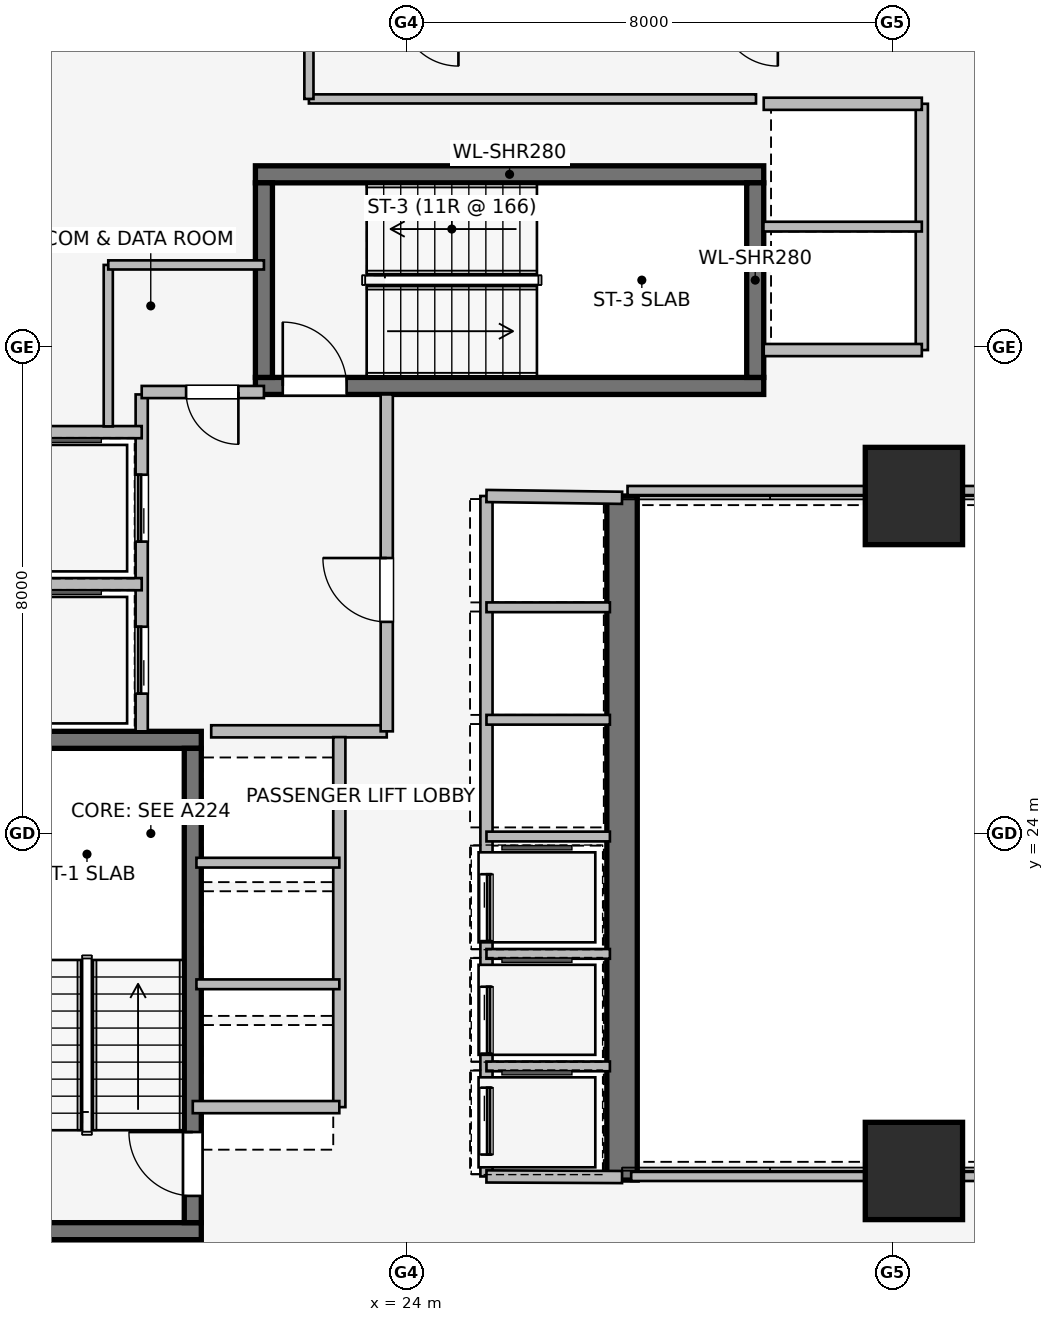
"""IFC4 building model, lengths in metres.
Left out: names, types, materials, properties, quantities, classifications, styles, units other than length and angle.
Written with IfcOpenShell. Run it as: python <this file> out.ifc"""

import sys

from ifc_helpers import new_model, si_unit, direction, frame, frame_2d, origin, origin_2d, place, context, subcontext, project, spatial, rectangle, extrude, element, fill, save


model = new_model("IFC4")
c1 = context("Model", 3, precision=1e-05, world=origin(), true_north=direction((0.0, 1.0)))
c2 = subcontext(c1, "Body", "Model", "MODEL_VIEW")
j1 = project(units=[si_unit("LENGTHUNIT", "METRE"), si_unit("PLANEANGLEUNIT", "RADIAN")], contexts=[c1])
p1 = place(None, origin())
s1 = spatial("IfcSite", under=j1, at=p1, CompositionType="ELEMENT")
p2 = place(p1, origin())
s2 = spatial("IfcBuilding", under=s1, at=p2, CompositionType="ELEMENT")
p3 = place(p2, frame((0.0, 0.0, 85.4)))
s3 = spatial("IfcBuildingStorey", under=s2, at=p3, CompositionType="ELEMENT", Elevation=85.4)
p4 = place(p3, frame((27.55, 29.55, 0.0), z_axis=(0.0, 0.0, 1.0), x_axis=(0.0, -1.0, 0.0)))
e1 = element("IfcWall", 1, at=p4, inside=s3, PredefinedType="SHEAR", context=c2, shape_type="SweptSolid", body=[
    extrude(rectangle(XDim=11.25, YDim=0.5, at=frame_2d((5.625, 0.0))), origin(), (0.0, 0.0, 1.0), 3.65),
])
for number, where, z_axis, x_axis in (
    (2, (16.87, 17.46, 0.0), (0.0, 0.0, 1.0), (1.0, 0.0, 0.0)),
    (3, (20.63, 25.54, 0.0), (0.0, 0.0, 1.0), (-1.0, 0.0, 0.0)),
):
    element("IfcWall", number, at=place(p3, frame(where, z_axis=z_axis, x_axis=x_axis)), inside=s3, PredefinedType="SHEAR", context=c2, shape_type="SweptSolid", body=[
        extrude(rectangle(XDim=3.76, YDim=0.28, at=frame_2d((1.88, 0.0))), origin(), (0.0, 0.0, 1.0), 3.65),
    ])
p5 = place(p3, frame((20.49, 17.6, 0.0), z_axis=(0.0, 0.0, 1.0), x_axis=(0.0, 1.0, 0.0)))
e4 = element("IfcWall", 4, at=p5, inside=s3, PredefinedType="SHEAR", context=c2, shape_type="SweptSolid", body=[
    extrude(rectangle(XDim=7.8, YDim=0.28, at=frame_2d((3.9, 0.0))), origin(), (0.0, 0.0, 1.0), 3.65),
])
p6 = place(p5, frame((0.44, 0.0, 0.0)))
e5 = element("IfcOpeningElement", 5, at=p6, cuts=e4, PredefinedType="OPENING", context=c2, shape_type="SweptSolid", body=[
    extrude(rectangle(XDim=1.05, YDim=2.0, at=frame_2d((0.525, 1.0))), frame((0.0, 0.15, 0.0), z_axis=(0.0, -1.0, 0.0), x_axis=(1.0, 0.0, 0.0)), (0.0, 0.0, 1.0), 0.3),
])
p7 = place(p3, frame((21.52, 31.36, 0.0), z_axis=(0.0, 0.0, 1.0), x_axis=(1.0, 0.0, 0.0)))
e6 = element("IfcWall", 6, at=p7, inside=s3, PredefinedType="SHEAR", context=c2, shape_type="SweptSolid", body=[
    extrude(rectangle(XDim=8.36, YDim=0.28, at=frame_2d((4.18, 0.0))), origin(), (0.0, 0.0, 1.0), 3.65),
])
p8 = place(p7, frame((0.45, 0.0, 0.0)))
e7 = element("IfcOpeningElement", 7, at=p8, cuts=e6, PredefinedType="OPENING", context=c2, shape_type="SweptSolid", body=[
    extrude(rectangle(XDim=1.05, YDim=2.0, at=frame_2d((0.525, 1.0))), frame((0.0, 0.15, 0.0), z_axis=(0.0, -1.0, 0.0), x_axis=(1.0, 0.0, 0.0)), (0.0, 0.0, 1.0), 0.3),
])
p9 = place(p3, frame((29.88, 34.84, 0.0), z_axis=(0.0, 0.0, 1.0), x_axis=(-1.0, 0.0, 0.0)))
e8 = element("IfcWall", 8, at=p9, inside=s3, PredefinedType="SHEAR", context=c2, shape_type="SweptSolid", body=[
    extrude(rectangle(XDim=8.36, YDim=0.28, at=frame_2d((4.18, 0.0))), origin(), (0.0, 0.0, 1.0), 3.65),
])
for number, where, z_axis, x_axis in (
    (9, (21.66, 34.7, 0.0), (0.0, 0.0, 1.0), (0.0, -1.0, 0.0)),
    (10, (29.74, 31.5, 0.0), (0.0, 0.0, 1.0), (0.0, 1.0, 0.0)),
):
    element("IfcWall", number, at=place(p3, frame(where, z_axis=z_axis, x_axis=x_axis)), inside=s3, PredefinedType="SHEAR", context=c2, shape_type="SweptSolid", body=[
        extrude(rectangle(XDim=3.2, YDim=0.28, at=frame_2d((1.6, 0.0))), origin(), (0.0, 0.0, 1.0), 3.65),
    ])
for number, where, z_axis, x_axis in (
    (11, (32.35, 18.45, 0.0), (0.0, 0.0, 1.0), (1.0, 0.0, 0.0)),
    (12, (32.35, 29.55, 0.0), (0.0, 0.0, 1.0), (1.0, 0.0, 0.0)),
):
    element("IfcColumn", number, at=place(p3, frame(where, z_axis=z_axis, x_axis=x_axis)), inside=s3, PredefinedType="COLUMN", context=c2, shape_type="SweptSolid", body=[
        extrude(rectangle(XDim=1.6, YDim=1.6, at=origin_2d()), origin(), (0.0, 0.0, 1.0), 3.65),
    ])
p10 = place(p3, frame((16.924, 36.841, 0.0), z_axis=(0.0, 0.0, 1.0), x_axis=(0.888634413993, 0.458616264721, 0.0)))
e13 = element("IfcWall", 13, at=p10, inside=s3, PredefinedType="STANDARD", context=c2, shape_type="SweptSolid", body=[
    extrude(rectangle(XDim=20.531, YDim=0.34, at=frame_2d((10.266, 0.0))), origin(), (0.0, 0.0, 1.0), 2.684),
])
p11 = place(p10, frame((5.111, 0.0, 0.75)))
e14 = element("IfcOpeningElement", 14, at=p11, cuts=e13, PredefinedType="OPENING", context=c2, shape_type="SweptSolid", body=[
    extrude(rectangle(XDim=1.8, YDim=1.5, at=frame_2d((0.9, 0.75))), frame((0.0, 0.18, 0.0), z_axis=(0.0, -1.0, 0.0), x_axis=(1.0, 0.0, 0.0)), (0.0, 0.0, 1.0), 0.36),
])
p12 = place(p10, frame((7.44, 0.0, 0.75)))
e15 = element("IfcOpeningElement", 15, at=p12, cuts=e13, PredefinedType="OPENING", context=c2, shape_type="SweptSolid", body=[
    extrude(rectangle(XDim=1.8, YDim=1.5, at=frame_2d((0.9, 0.75))), frame((0.0, 0.18, 0.0), z_axis=(0.0, -1.0, 0.0), x_axis=(1.0, 0.0, 0.0)), (0.0, 0.0, 1.0), 0.36),
])
p13 = place(p10, frame((10.843, 0.0, 0.75)))
e16 = element("IfcOpeningElement", 16, at=p13, cuts=e13, PredefinedType="OPENING", context=c2, shape_type="SweptSolid", body=[
    extrude(rectangle(XDim=1.5, YDim=1.5, at=frame_2d((0.75, 0.75))), frame((0.0, 0.18, 0.0), z_axis=(0.0, -1.0, 0.0), x_axis=(1.0, 0.0, 0.0)), (0.0, 0.0, 1.0), 0.36),
])
p14 = place(p10, frame((13.571, 0.0, 0.75)))
e17 = element("IfcOpeningElement", 17, at=p14, cuts=e13, PredefinedType="OPENING", context=c2, shape_type="SweptSolid", body=[
    extrude(rectangle(XDim=1.5, YDim=1.5, at=frame_2d((0.75, 0.75))), frame((0.0, 0.18, 0.0), z_axis=(0.0, -1.0, 0.0), x_axis=(1.0, 0.0, 0.0)), (0.0, 0.0, 1.0), 0.36),
])
p15 = place(p10, frame((17.476, 0.0, 0.75)))
e18 = element("IfcOpeningElement", 18, at=p15, cuts=e13, PredefinedType="OPENING", context=c2, shape_type="SweptSolid", body=[
    extrude(rectangle(XDim=1.05, YDim=1.4, at=frame_2d((0.525, 0.7))), frame((0.0, 0.18, 0.0), z_axis=(0.0, -1.0, 0.0), x_axis=(1.0, 0.0, 0.0)), (0.0, 0.0, 1.0), 0.36),
])
p16 = place(p3, frame((19.65, 25.68, 0.0), z_axis=(0.0, 0.0, 1.0), x_axis=(0.0, 1.0, 0.0)))
e19 = element("IfcWall", 19, at=p16, inside=s3, PredefinedType="PARTITIONING", context=c2, shape_type="SweptSolid", body=[
    extrude(rectangle(XDim=5.54, YDim=0.2, at=frame_2d((2.77, 0.0))), origin(), (0.0, 0.0, 1.0), 3.39),
])
p17 = place(p16, frame((0.62, 0.0, 0.0)))
e20 = element("IfcOpeningElement", 20, at=p17, cuts=e19, PredefinedType="OPENING", context=c2, shape_type="SweptSolid", body=[
    extrude(rectangle(XDim=1.1, YDim=2.2, at=frame_2d((0.55, 1.1))), frame((0.0, 0.11, 0.0), z_axis=(0.0, -1.0, 0.0), x_axis=(1.0, 0.0, 0.0)), (0.0, 0.0, 1.0), 0.22),
])
p18 = place(p16, frame((3.12, 0.0, 0.0)))
e21 = element("IfcOpeningElement", 21, at=p18, cuts=e19, PredefinedType="OPENING", context=c2, shape_type="SweptSolid", body=[
    extrude(rectangle(XDim=1.1, YDim=2.2, at=frame_2d((0.55, 1.1))), frame((0.0, 0.11, 0.0), z_axis=(0.0, -1.0, 0.0), x_axis=(1.0, 0.0, 0.0)), (0.0, 0.0, 1.0), 0.22),
])
p19 = place(p3, frame((20.793, 25.68, 0.0), z_axis=(0.0, 0.0, 1.0), x_axis=(1.0, 0.0, 0.0)))
e22 = element("IfcWall", 22, at=p19, inside=s3, PredefinedType="PARTITIONING", context=c2, shape_type="SweptSolid", body=[
    extrude(rectangle(XDim=2.887, YDim=0.2, at=frame_2d((1.443, 0.0))), origin(), (0.0, 0.0, 1.0), 3.39),
])
p20 = place(p3, frame((23.68, 25.68, 0.0), z_axis=(0.0, 0.0, 1.0), x_axis=(0.0, 1.0, 0.0)))
e23 = element("IfcWall", 23, at=p20, inside=s3, PredefinedType="PARTITIONING", context=c2, shape_type="SweptSolid", body=[
    extrude(rectangle(XDim=5.54, YDim=0.2, at=frame_2d((2.77, 0.0))), origin(), (0.0, 0.0, 1.0), 3.39),
])
p21 = place(p20, frame((1.8, 0.0, 0.0)))
e24 = element("IfcOpeningElement", 24, at=p21, cuts=e23, PredefinedType="OPENING", context=c2, shape_type="SweptSolid", body=[
    extrude(rectangle(XDim=1.05, YDim=2.0, at=frame_2d((0.525, 1.0))), frame((0.0, 0.11, 0.0), z_axis=(0.0, -1.0, 0.0), x_axis=(1.0, 0.0, 0.0)), (0.0, 0.0, 1.0), 0.22),
])
p22 = place(p3, frame((21.66, 31.26, 0.0), z_axis=(0.0, 0.0, 1.0), x_axis=(-1.0, 0.0, 0.0)))
e25 = element("IfcWall", 25, at=p22, inside=s3, PredefinedType="PARTITIONING", context=c2, shape_type="SweptSolid", body=[
    extrude(rectangle(XDim=2.01, YDim=0.2, at=frame_2d((1.005, 0.0))), origin(), (0.0, 0.0, 1.0), 3.39),
])
p23 = place(p22, frame((0.42, 0.0, 0.0)))
e26 = element("IfcOpeningElement", 26, at=p23, cuts=e25, PredefinedType="OPENING", context=c2, shape_type="SweptSolid", body=[
    extrude(rectangle(XDim=0.86, YDim=2.0, at=frame_2d((0.43, 1.0))), frame((0.0, 0.11, 0.0), z_axis=(0.0, -1.0, 0.0), x_axis=(1.0, 0.0, 0.0)), (0.0, 0.0, 1.0), 0.22),
])
p24 = place(p3, frame((17.15, 28.1, 0.0), z_axis=(0.0, 0.0, 1.0), x_axis=(1.0, 0.0, 0.0)))
e27 = element("IfcWall", 27, at=p24, inside=s3, PredefinedType="PARTITIONING", context=c2, shape_type="SweptSolid", body=[
    extrude(rectangle(XDim=2.5, YDim=0.2, at=frame_2d((1.25, 0.0))), origin(), (0.0, 0.0, 1.0), 3.39),
])
p25 = place(p3, frame((19.65, 30.6, 0.0), z_axis=(0.0, 0.0, 1.0), x_axis=(-1.0, 0.0, 0.0)))
e28 = element("IfcWall", 28, at=p25, inside=s3, PredefinedType="PARTITIONING", context=c2, shape_type="SweptSolid", body=[
    extrude(rectangle(XDim=2.5, YDim=0.2, at=frame_2d((1.25, 0.0))), origin(), (0.0, 0.0, 1.0), 2.29),
])
p26 = place(p3, frame((32.48, 31.95, 0.0), z_axis=(0.0, 0.0, 1.0), x_axis=(0.0, 1.0, 0.0)))
e29 = element("IfcWall", 29, at=p26, inside=s3, PredefinedType="PARTITIONING", context=c2, shape_type="SweptSolid", body=[
    extrude(rectangle(XDim=4.05, YDim=0.2, at=frame_2d((2.025, 0.0))), origin(), (0.0, 0.0, 1.0), 2.513),
])
for number, where, z_axis, x_axis in (
    (30, (29.88, 36.0, 0.0), (0.0, 0.0, 1.0), (1.0, 0.0, 0.0)),
    (31, (32.48, 31.95, 0.0), (0.0, 0.0, 1.0), (-1.0, 0.0, 0.0)),
):
    element("IfcWall", number, at=place(p3, frame(where, z_axis=z_axis, x_axis=x_axis)), inside=s3, PredefinedType="PARTITIONING", context=c2, shape_type="SweptSolid", body=[
        extrude(rectangle(XDim=2.6, YDim=0.2, at=frame_2d((1.3, 0.0))), origin(), (0.0, 0.0, 1.0), 3.39),
    ])
p27 = place(p3, frame((29.875, 33.98, 0.0), z_axis=(0.0, 0.0, 1.0), x_axis=(1.0, 0.0, 0.0)))
e32 = element("IfcWall", 32, at=p27, inside=s3, PredefinedType="PARTITIONING", context=c2, shape_type="SweptSolid", body=[
    extrude(rectangle(XDim=2.605, YDim=0.16, at=frame_2d((1.302, 0.0))), origin(), (0.0, 0.0, 1.0), 3.39),
])
p28 = place(p3, frame((22.9, 19.5, 0.0), z_axis=(0.0, 0.0, 1.0), x_axis=(0.0, 1.0, 0.0)))
e33 = element("IfcWall", 33, at=p28, inside=s3, PredefinedType="PARTITIONING", context=c2, shape_type="SweptSolid", body=[
    extrude(rectangle(XDim=6.085, YDim=0.2, at=frame_2d((3.042, 0.0))), origin(), (0.0, 0.0, 1.0), 3.39),
])
p29 = place(p3, frame((20.49, 19.5, 0.0), z_axis=(0.0, 0.0, 1.0), x_axis=(1.0, 0.0, 0.0)))
e34 = element("IfcWall", 34, at=p29, inside=s3, PredefinedType="PARTITIONING", context=c2, shape_type="SweptSolid", body=[
    extrude(rectangle(XDim=2.41, YDim=0.2, at=frame_2d((1.205, 0.0))), origin(), (0.0, 0.0, 1.0), 2.29),
])
for number, where, z_axis, x_axis in (
    (35, (20.55, 21.52, 0.0), (0.0, 0.0, 1.0), (1.0, 0.0, 0.0)),
    (36, (20.55, 23.52, 0.0), (0.0, 0.0, 1.0), (1.0, 0.0, 0.0)),
):
    element("IfcWall", number, at=place(p3, frame(where, z_axis=z_axis, x_axis=x_axis)), inside=s3, PredefinedType="PARTITIONING", context=c2, shape_type="SweptSolid", body=[
        extrude(rectangle(XDim=2.35, YDim=0.16, at=frame_2d((1.175, 0.0))), origin(), (0.0, 0.0, 1.0), 3.39),
    ])
p30 = place(p3, frame((25.32, 29.55, 0.0), z_axis=(0.0, 0.0, 1.0), x_axis=(0.0, -1.0, 0.0)))
e37 = element("IfcWall", 37, at=p30, inside=s3, PredefinedType="PARTITIONING", context=c2, shape_type="SweptSolid", body=[
    extrude(rectangle(XDim=11.19, YDim=0.2, at=frame_2d((5.595, 0.0))), origin(), (0.0, 0.0, 1.0), 3.39),
])
p31 = place(p30, frame((6.22, 0.0, 0.0)))
e38 = element("IfcOpeningElement", 38, at=p31, cuts=e37, PredefinedType="OPENING", context=c2, shape_type="SweptSolid", body=[
    extrude(rectangle(XDim=1.1, YDim=2.2, at=frame_2d((0.55, 1.1))), frame((0.0, 0.11, 0.0), z_axis=(0.0, -1.0, 0.0), x_axis=(1.0, 0.0, 0.0)), (0.0, 0.0, 1.0), 0.22),
])
p32 = place(p30, frame((8.07, 0.0, 0.0)))
e39 = element("IfcOpeningElement", 39, at=p32, cuts=e37, PredefinedType="OPENING", context=c2, shape_type="SweptSolid", body=[
    extrude(rectangle(XDim=1.1, YDim=2.2, at=frame_2d((0.55, 1.1))), frame((0.0, 0.11, 0.0), z_axis=(0.0, -1.0, 0.0), x_axis=(1.0, 0.0, 0.0)), (0.0, 0.0, 1.0), 0.22),
])
p33 = place(p30, frame((9.73, 0.0, 0.0)))
e40 = element("IfcOpeningElement", 40, at=p33, cuts=e37, PredefinedType="OPENING", context=c2, shape_type="SweptSolid", body=[
    extrude(rectangle(XDim=1.1, YDim=2.2, at=frame_2d((0.55, 1.1))), frame((0.0, 0.11, 0.0), z_axis=(0.0, -1.0, 0.0), x_axis=(1.0, 0.0, 0.0)), (0.0, 0.0, 1.0), 0.22),
])
p34 = place(p3, frame((25.32, 18.36, 0.0), z_axis=(0.0, 0.0, 1.0), x_axis=(0.999989925833, -0.004488678231, 0.0)))
e41 = element("IfcWall", 41, at=p34, inside=s3, PredefinedType="PARTITIONING", context=c2, shape_type="SweptSolid", body=[
    extrude(rectangle(XDim=2.23, YDim=0.2, at=frame_2d((1.115, 0.0))), origin(), (0.0, 0.0, 1.0), 3.39),
])
p35 = place(p3, frame((27.55, 29.52, 0.0), z_axis=(0.0, 0.0, 1.0), x_axis=(-0.999909343457, 0.013464949556, 0.0)))
e42 = element("IfcWall", 42, at=p35, inside=s3, PredefinedType="PARTITIONING", context=c2, shape_type="SweptSolid", body=[
    extrude(rectangle(XDim=2.23, YDim=0.2, at=frame_2d((1.115, 0.0))), origin(), (0.0, 0.0, 1.0), 2.29),
])
for number, where, z_axis, x_axis in (
    (43, (25.32, 20.17, 0.0), (0.0, 0.0, 1.0), (1.0, 0.0, 0.0)),
    (44, (25.32, 22.02, 0.0), (0.0, 0.0, 1.0), (1.0, 0.0, 0.0)),
    (45, (25.32, 23.95, 0.0), (0.0, 0.0, 1.0), (1.0, 0.0, 0.0)),
    (46, (25.32, 25.87, 0.0), (0.0, 0.0, 1.0), (1.0, 0.0, 0.0)),
    (47, (25.32, 27.72, 0.0), (0.0, 0.0, 1.0), (1.0, 0.0, 0.0)),
):
    element("IfcWall", number, at=place(p3, frame(where, z_axis=z_axis, x_axis=x_axis)), inside=s3, PredefinedType="PARTITIONING", context=c2, shape_type="SweptSolid", body=[
        extrude(rectangle(XDim=2.03, YDim=0.16, at=frame_2d((1.015, 0.0))), origin(), (0.0, 0.0, 1.0), 3.39),
    ])
p36 = place(p3, frame((19.1, 33.35, 0.0), z_axis=(0.0, 0.0, 1.0), x_axis=(0.0, -1.0, 0.0)))
e48 = element("IfcWall", 48, at=p36, inside=s3, PredefinedType="PARTITIONING", context=c2, shape_type="SweptSolid", body=[
    extrude(rectangle(XDim=2.655, YDim=0.15, at=frame_2d((1.328, 0.0))), origin(), (0.0, 0.0, 1.0), 3.39),
])
p37 = place(p3, frame((21.66, 33.35, 0.0), z_axis=(0.0, 0.0, 1.0), x_axis=(-1.0, 0.0, 0.0)))
e49 = element("IfcWall", 49, at=p37, inside=s3, PredefinedType="PARTITIONING", context=c2, shape_type="SweptSolid", body=[
    extrude(rectangle(XDim=2.56, YDim=0.15, at=frame_2d((1.28, 0.0))), origin(), (0.0, 0.0, 1.0), 3.39),
])
p38 = place(p3, frame((27.7, 18.36, 0.0), z_axis=(0.0, 0.0, 1.0), x_axis=(1.0, 0.0, 0.0)))
e50 = element("IfcWall", 50, at=p38, inside=s3, PredefinedType="PARTITIONING", context=c2, shape_type="SweptSolid", body=[
    extrude(rectangle(XDim=12.14, YDim=0.15, at=frame_2d((6.07, 0.0))), origin(), (0.0, 0.0, 1.0), 2.531),
])
p39 = place(p3, frame((39.84, 29.64, 0.0), z_axis=(0.0, 0.0, 1.0), x_axis=(-1.0, 0.0, 0.0)))
e51 = element("IfcWall", 51, at=p39, inside=s3, PredefinedType="PARTITIONING", context=c2, shape_type="SweptSolid", body=[
    extrude(rectangle(XDim=12.2, YDim=0.15, at=frame_2d((6.1, 0.0))), origin(), (0.0, 0.0, 1.0), 2.531),
])
p40 = place(p3, frame((29.753, 36.08, 0.0), z_axis=(0.0, 0.0, 1.0), x_axis=(-1.0, 0.0, 0.0)))
e52 = element("IfcWall", 52, at=p40, inside=s3, PredefinedType="PARTITIONING", context=c2, shape_type="SweptSolid", body=[
    extrude(rectangle(XDim=7.353, YDim=0.15, at=frame_2d((3.677, 0.0))), origin(), (0.0, 0.0, 1.0), 3.39),
])
p41 = place(p3, frame((22.4, 36.08, 0.0), z_axis=(0.0, 0.0, 1.0), x_axis=(0.0, 1.0, 0.0)))
e53 = element("IfcWall", 53, at=p41, inside=s3, PredefinedType="PARTITIONING", context=c2, shape_type="SweptSolid", body=[
    extrude(rectangle(XDim=1.43, YDim=0.15, at=frame_2d((0.715, 0.0))), origin(), (0.0, 0.0, 1.0), 3.39),
])
p42 = place(p6, origin())
e54 = element("IfcDoor", 54, at=p42, inside=s3, OperationType="SINGLE_SWING_RIGHT", PredefinedType="DOOR", context=c2, shape_type="SweptSolid", body=[
    extrude(rectangle(XDim=1.05, YDim=2.0, at=frame_2d((0.525, 1.0))), frame((0.0, 0.025, 0.0), z_axis=(0.0, -1.0, 0.0), x_axis=(1.0, 0.0, 0.0)), (0.0, 0.0, 1.0), 0.05),
])
fill(e5, e54)
p43 = place(p8, origin())
e55 = element("IfcDoor", 55, at=p43, inside=s3, OperationType="SINGLE_SWING_LEFT", PredefinedType="DOOR", context=c2, shape_type="SweptSolid", body=[
    extrude(rectangle(XDim=1.05, YDim=2.0, at=frame_2d((0.525, 1.0))), frame((0.0, 0.025, 0.0), z_axis=(0.0, -1.0, 0.0), x_axis=(1.0, 0.0, 0.0)), (0.0, 0.0, 1.0), 0.05),
])
fill(e7, e55)
p44 = place(p17, origin())
e56 = element("IfcDoor", 56, at=p44, inside=s3, OperationType="SLIDING_TO_LEFT", PredefinedType="DOOR", context=c2, shape_type="SweptSolid", body=[
    extrude(rectangle(XDim=1.1, YDim=2.2, at=frame_2d((0.55, 1.1))), frame((0.0, 0.025, 0.0), z_axis=(0.0, -1.0, 0.0), x_axis=(1.0, 0.0, 0.0)), (0.0, 0.0, 1.0), 0.05),
])
fill(e20, e56)
p45 = place(p18, origin())
e57 = element("IfcDoor", 57, at=p45, inside=s3, OperationType="SLIDING_TO_LEFT", PredefinedType="DOOR", context=c2, shape_type="SweptSolid", body=[
    extrude(rectangle(XDim=1.1, YDim=2.2, at=frame_2d((0.55, 1.1))), frame((0.0, 0.025, 0.0), z_axis=(0.0, -1.0, 0.0), x_axis=(1.0, 0.0, 0.0)), (0.0, 0.0, 1.0), 0.05),
])
fill(e21, e57)
p46 = place(p21, origin())
e58 = element("IfcDoor", 58, at=p46, inside=s3, OperationType="SINGLE_SWING_RIGHT", PredefinedType="DOOR", context=c2, shape_type="SweptSolid", body=[
    extrude(rectangle(XDim=1.05, YDim=2.0, at=frame_2d((0.525, 1.0))), frame((0.0, 0.025, 0.0), z_axis=(0.0, -1.0, 0.0), x_axis=(1.0, 0.0, 0.0)), (0.0, 0.0, 1.0), 0.05),
])
fill(e24, e58)
p47 = place(p23, origin())
e59 = element("IfcDoor", 59, at=p47, inside=s3, OperationType="SINGLE_SWING_LEFT", PredefinedType="DOOR", context=c2, shape_type="SweptSolid", body=[
    extrude(rectangle(XDim=0.86, YDim=2.0, at=frame_2d((0.43, 1.0))), frame((0.0, 0.025, 0.0), z_axis=(0.0, -1.0, 0.0), x_axis=(1.0, 0.0, 0.0)), (0.0, 0.0, 1.0), 0.05),
])
fill(e26, e59)
p48 = place(p31, origin())
e60 = element("IfcDoor", 60, at=p48, inside=s3, OperationType="SLIDING_TO_LEFT", PredefinedType="DOOR", context=c2, shape_type="SweptSolid", body=[
    extrude(rectangle(XDim=1.1, YDim=2.2, at=frame_2d((0.55, 1.1))), frame((0.0, 0.025, 0.0), z_axis=(0.0, -1.0, 0.0), x_axis=(1.0, 0.0, 0.0)), (0.0, 0.0, 1.0), 0.05),
])
fill(e38, e60)
p49 = place(p32, origin())
e61 = element("IfcDoor", 61, at=p49, inside=s3, OperationType="SLIDING_TO_LEFT", PredefinedType="DOOR", context=c2, shape_type="SweptSolid", body=[
    extrude(rectangle(XDim=1.1, YDim=2.2, at=frame_2d((0.55, 1.1))), frame((0.0, 0.025, 0.0), z_axis=(0.0, -1.0, 0.0), x_axis=(1.0, 0.0, 0.0)), (0.0, 0.0, 1.0), 0.05),
])
fill(e39, e61)
p50 = place(p33, origin())
e62 = element("IfcDoor", 62, at=p50, inside=s3, OperationType="SLIDING_TO_LEFT", PredefinedType="DOOR", context=c2, shape_type="SweptSolid", body=[
    extrude(rectangle(XDim=1.1, YDim=2.2, at=frame_2d((0.55, 1.1))), frame((0.0, 0.025, 0.0), z_axis=(0.0, -1.0, 0.0), x_axis=(1.0, 0.0, 0.0)), (0.0, 0.0, 1.0), 0.05),
])
fill(e40, e62)
save(model, sys.argv[1])
